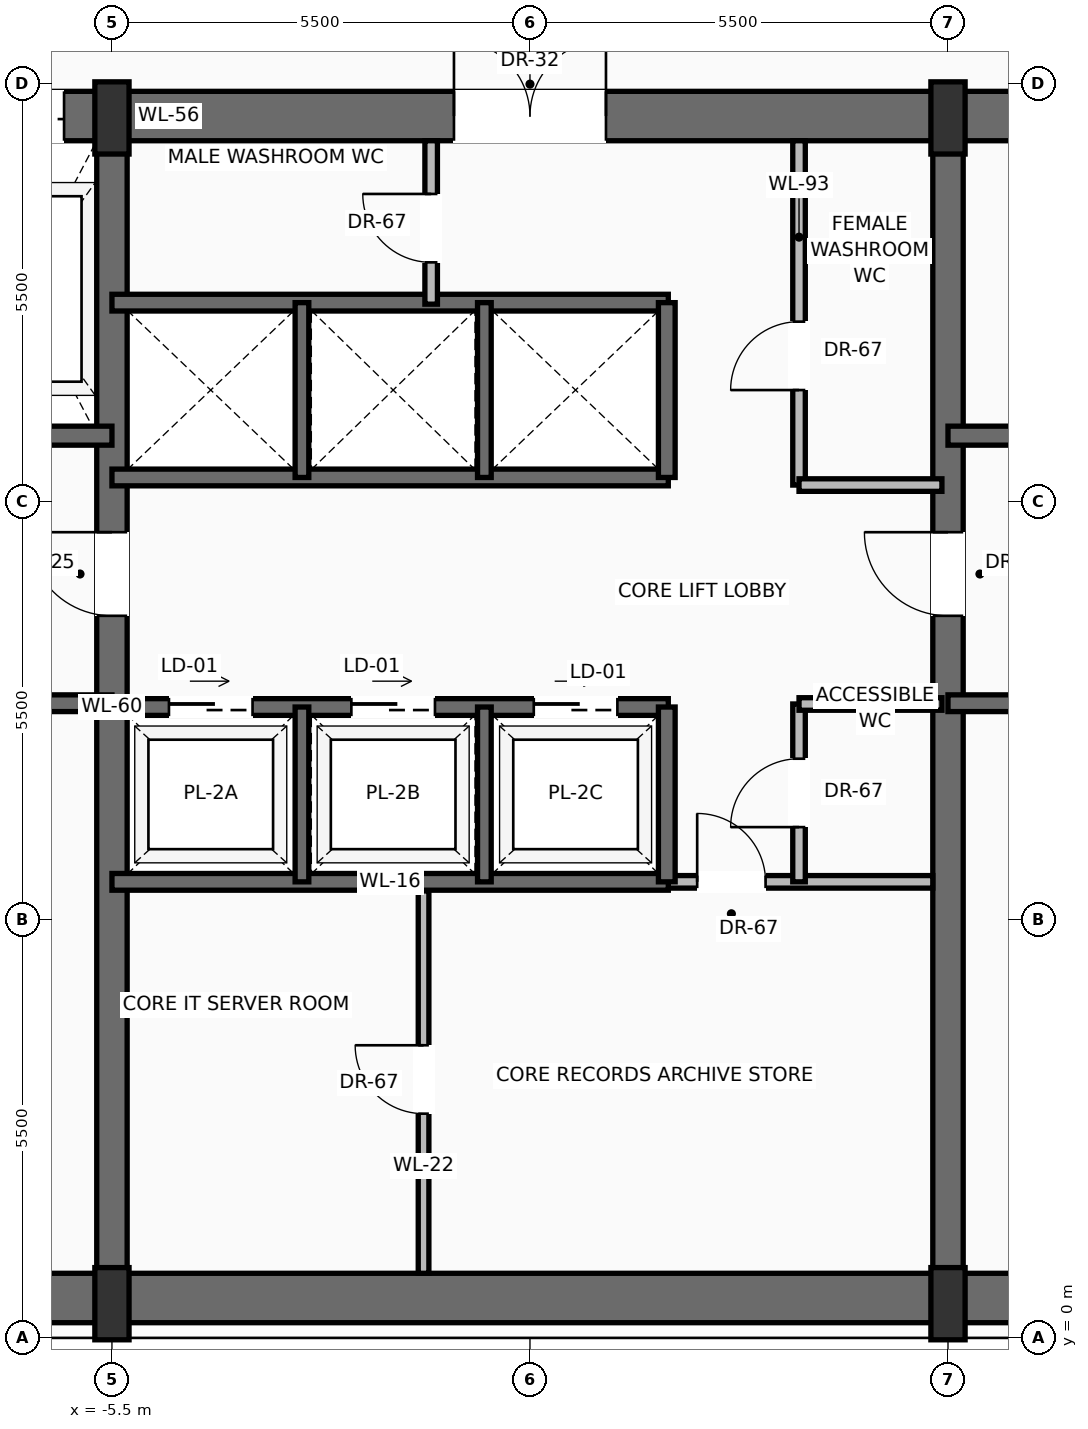
"""IFC4 building model, lengths in metres.
Left out: names, types, materials, properties, quantities, classifications, styles, units other than length and angle.
Written with IfcOpenShell. Run it as: python <this file> out.ifc"""

import sys

from ifc_helpers import new_model, si_unit, direction, frame, frame_2d, origin, origin_2d, place, context, subcontext, project, spatial, rectangle, extrude, source, transform, mapped, element, fill, save


model = new_model("IFC4")
c1 = context("Model", 3, precision=1e-05, world=origin(), true_north=direction((0.0, 1.0)))
c2 = subcontext(c1, "Body", "Model", "MODEL_VIEW")
j1 = project(units=[si_unit("LENGTHUNIT", "METRE"), si_unit("PLANEANGLEUNIT", "RADIAN")], contexts=[c1])
p1 = place(None, origin())
s1 = spatial("IfcSite", under=j1, at=p1, CompositionType="ELEMENT")
p2 = place(p1, origin())
s2 = spatial("IfcBuilding", under=s1, at=p2, CompositionType="ELEMENT")
p3 = place(p2, frame((0.0, 0.0, 182.1)))
s3 = spatial("IfcBuildingStorey", under=s2, at=p3, CompositionType="ELEMENT", Elevation=182.1)
p4 = place(p3, frame((-10.65, 0.525, 0.0), z_axis=(0.0, 0.0, 1.0), x_axis=(1.0, 0.0, 0.0)))
e1 = element("IfcWall", 1, at=p4, inside=s3, PredefinedType="SHEAR", context=c2, shape_type="SweptSolid", body=[
    extrude(rectangle(XDim=21.3, YDim=0.65, at=frame_2d((10.65, 0.0))), origin(), (0.0, 0.0, 1.0), 3.47),
])
p5 = place(p3, frame((-10.8, 16.075, 0.0), z_axis=(0.0, 0.0, 1.0), x_axis=(1.0, 0.0, 0.0)))
e2 = element("IfcWall", 2, at=p5, inside=s3, PredefinedType="SHEAR", context=c2, shape_type="SweptSolid", body=[
    extrude(rectangle(XDim=21.6, YDim=0.65, at=frame_2d((10.8, 0.0))), origin(), (0.0, 0.0, 1.0), 3.47),
])
p6 = place(p5, frame((3.37, 0.0, 0.0)))
e3 = element("IfcOpeningElement", 3, at=p6, cuts=e2, PredefinedType="OPENING", context=c2, shape_type="SweptSolid", body=[
    extrude(rectangle(XDim=1.3, YDim=2.3, at=frame_2d((0.65, 1.15))), frame((0.0, 0.335, 0.0), z_axis=(0.0, -1.0, 0.0), x_axis=(1.0, 0.0, 0.0)), (0.0, 0.0, 1.0), 0.67),
])
p7 = place(p5, frame((9.8, 0.0, 0.0)))
e4 = element("IfcOpeningElement", 4, at=p7, cuts=e2, PredefinedType="OPENING", context=c2, shape_type="SweptSolid", body=[
    extrude(rectangle(XDim=2.0, YDim=2.4, at=frame_2d((1.0, 1.2))), frame((0.0, 0.335, 0.0), z_axis=(0.0, -1.0, 0.0), x_axis=(1.0, 0.0, 0.0)), (0.0, 0.0, 1.0), 0.67),
])
p8 = place(p3, frame((-5.5, 0.525, 0.0), z_axis=(0.0, 0.0, 1.0), x_axis=(0.0, 1.0, 0.0)))
e5 = element("IfcWall", 5, at=p8, inside=s3, PredefinedType="SHEAR", context=c2, shape_type="SweptSolid", body=[
    extrude(rectangle(XDim=15.55, YDim=0.4, at=frame_2d((7.775, 0.0))), origin(), (0.0, 0.0, 1.0), 3.47),
])
p9 = place(p8, frame((8.975, 0.0, 0.0)))
e6 = element("IfcOpeningElement", 6, at=p9, cuts=e5, PredefinedType="OPENING", context=c2, shape_type="SweptSolid", body=[
    extrude(rectangle(XDim=1.1, YDim=2.2, at=frame_2d((0.55, 1.1))), frame((0.0, 0.21, 0.0), z_axis=(0.0, -1.0, 0.0), x_axis=(1.0, 0.0, 0.0)), (0.0, 0.0, 1.0), 0.42),
])
p10 = place(p3, frame((5.5, 0.525, 0.0), z_axis=(0.0, 0.0, 1.0), x_axis=(0.0, 1.0, 0.0)))
e7 = element("IfcWall", 7, at=p10, inside=s3, PredefinedType="SHEAR", context=c2, shape_type="SweptSolid", body=[
    extrude(rectangle(XDim=15.55, YDim=0.4, at=frame_2d((7.775, 0.0))), origin(), (0.0, 0.0, 1.0), 3.47),
])
p11 = place(p10, frame((8.975, 0.0, 0.0)))
e8 = element("IfcOpeningElement", 8, at=p11, cuts=e7, PredefinedType="OPENING", context=c2, shape_type="SweptSolid", body=[
    extrude(rectangle(XDim=1.1, YDim=2.2, at=frame_2d((0.55, 1.1))), frame((0.0, 0.21, 0.0), z_axis=(0.0, -1.0, 0.0), x_axis=(1.0, 0.0, 0.0)), (0.0, 0.0, 1.0), 0.42),
])
m1 = source(origin(), c2, "Body", "SweptSolid", [
    extrude(rectangle(XDim=0.45, YDim=0.95, at=origin_2d()), origin(), (0.0, 0.0, 1.0), 3.7),
])
for number, where, z_axis, x_axis in (
    (9, (-5.5, 0.45, 0.0), (0.0, 0.0, 1.0), (1.0, 0.0, 0.0)),
    (10, (5.5, 0.45, 0.0), (0.0, 0.0, 1.0), (1.0, 0.0, 0.0)),
    (11, (-5.5, 16.05, 0.0), (0.0, 0.0, 1.0), (1.0, 0.0, 0.0)),
    (12, (5.5, 16.05, 0.0), (0.0, 0.0, 1.0), (1.0, 0.0, 0.0)),
):
    element("IfcColumn", number, at=place(p3, frame(where, z_axis=z_axis, x_axis=x_axis)), inside=s3, PredefinedType="PILASTER", context=c2, shape_type="MappedRepresentation", body=[
        mapped(m1, transform((0.0, 0.0, 0.0), scale=1.0)),
    ])
p12 = place(p3, frame((-5.5, 8.35, 0.0), z_axis=(0.0, 0.0, 1.0), x_axis=(-1.0, 0.0, 0.0)))
e13 = element("IfcWall", 13, at=p12, inside=s3, PredefinedType="SOLIDWALL", context=c2, shape_type="SweptSolid", body=[
    extrude(rectangle(XDim=4.65, YDim=0.22, at=frame_2d((2.325, 0.0))), origin(), (0.0, 0.0, 1.0), 3.47),
])
p13 = place(p12, frame((2.5, 0.0, 0.0)))
e14 = element("IfcOpeningElement", 14, at=p13, cuts=e13, PredefinedType="OPENING", context=c2, shape_type="SweptSolid", body=[
    extrude(rectangle(XDim=1.15, YDim=2.2, at=frame_2d((0.575, 1.1))), frame((0.0, 0.12, 0.0), z_axis=(0.0, -1.0, 0.0), x_axis=(1.0, 0.0, 0.0)), (0.0, 0.0, 1.0), 0.24),
])
p14 = place(p3, frame((-5.5, 11.87, 0.0), z_axis=(0.0, 0.0, 1.0), x_axis=(-1.0, 0.0, 0.0)))
e15 = element("IfcWall", 15, at=p14, inside=s3, PredefinedType="SOLIDWALL", context=c2, shape_type="SweptSolid", body=[
    extrude(rectangle(XDim=4.65, YDim=0.25, at=frame_2d((2.325, 0.0))), origin(), (0.0, 0.0, 1.0), 3.47),
])
p15 = place(p14, frame((2.95, 0.0, 0.0)))
e16 = element("IfcOpeningElement", 16, at=p15, cuts=e15, PredefinedType="OPENING", context=c2, shape_type="SweptSolid", body=[
    extrude(rectangle(XDim=1.2, YDim=2.25, at=frame_2d((0.6, 1.125))), frame((0.0, 0.135, 0.0), z_axis=(0.0, -1.0, 0.0), x_axis=(1.0, 0.0, 0.0)), (0.0, 0.0, 1.0), 0.27),
])
p16 = place(p3, frame((10.15, 8.35, 0.0), z_axis=(0.0, 0.0, 1.0), x_axis=(-1.0, 0.0, 0.0)))
e17 = element("IfcWall", 17, at=p16, inside=s3, PredefinedType="SOLIDWALL", context=c2, shape_type="SweptSolid", body=[
    extrude(rectangle(XDim=4.65, YDim=0.22, at=frame_2d((2.325, 0.0))), origin(), (0.0, 0.0, 1.0), 3.47),
])
p17 = place(p16, frame((1.0, 0.0, 0.0)))
e18 = element("IfcOpeningElement", 18, at=p17, cuts=e17, PredefinedType="OPENING", context=c2, shape_type="SweptSolid", body=[
    extrude(rectangle(XDim=1.15, YDim=2.2, at=frame_2d((0.575, 1.1))), frame((0.0, 0.12, 0.0), z_axis=(0.0, -1.0, 0.0), x_axis=(1.0, 0.0, 0.0)), (0.0, 0.0, 1.0), 0.24),
])
p18 = place(p3, frame((10.15, 11.87, 0.0), z_axis=(0.0, 0.0, 1.0), x_axis=(-1.0, 0.0, 0.0)))
e19 = element("IfcWall", 19, at=p18, inside=s3, PredefinedType="SOLIDWALL", context=c2, shape_type="SweptSolid", body=[
    extrude(rectangle(XDim=4.65, YDim=0.25, at=frame_2d((2.325, 0.0))), origin(), (0.0, 0.0, 1.0), 3.47),
])
p19 = place(p18, frame((0.5, 0.0, 0.0)))
e20 = element("IfcOpeningElement", 20, at=p19, cuts=e19, PredefinedType="OPENING", context=c2, shape_type="SweptSolid", body=[
    extrude(rectangle(XDim=1.2, YDim=2.25, at=frame_2d((0.6, 1.125))), frame((0.0, 0.135, 0.0), z_axis=(0.0, -1.0, 0.0), x_axis=(1.0, 0.0, 0.0)), (0.0, 0.0, 1.0), 0.27),
])
p20 = place(p3, frame((1.82, 6.0, 0.0), z_axis=(0.0, 0.0, 1.0), x_axis=(1.0, 0.0, 0.0)))
e21 = element("IfcWall", 21, at=p20, inside=s3, PredefinedType="PARTITIONING", context=c2, shape_type="SweptSolid", body=[
    extrude(rectangle(XDim=3.48, YDim=0.165, at=frame_2d((1.74, 0.0))), origin(), (0.0, 0.0, 1.0), 3.462),
])
p21 = place(p20, frame((0.38, 0.0, 0.0)))
e22 = element("IfcOpeningElement", 22, at=p21, cuts=e21, PredefinedType="OPENING", context=c2, shape_type="SweptSolid", body=[
    extrude(rectangle(XDim=0.9, YDim=2.1, at=frame_2d((0.45, 1.05))), frame((0.0, 0.093, 0.0), z_axis=(0.0, -1.0, 0.0), x_axis=(1.0, 0.0, 0.0)), (0.0, 0.0, 1.0), 0.185),
])
p22 = place(p3, frame((-1.4, 0.85, 0.0), z_axis=(0.0, 0.0, 1.0), x_axis=(0.0, 1.0, 0.0)))
e23 = element("IfcWall", 23, at=p22, inside=s3, PredefinedType="PARTITIONING", context=c2, shape_type="SweptSolid", body=[
    extrude(rectangle(XDim=5.03, YDim=0.14, at=frame_2d((2.515, 0.0))), origin(), (0.0, 0.0, 1.0), 3.462),
])
p23 = place(p22, frame((2.1, 0.0, 0.0)))
e24 = element("IfcOpeningElement", 24, at=p23, cuts=e23, PredefinedType="OPENING", context=c2, shape_type="SweptSolid", body=[
    extrude(rectangle(XDim=0.9, YDim=2.1, at=frame_2d((0.45, 1.05))), frame((0.0, 0.08, 0.0), z_axis=(0.0, -1.0, 0.0), x_axis=(1.0, 0.0, 0.0)), (0.0, 0.0, 1.0), 0.16),
])
p24 = place(p3, frame((3.54, 6.0, 0.0), z_axis=(0.0, 0.0, 1.0), x_axis=(0.0, 1.0, 0.0)))
e25 = element("IfcWall", 25, at=p24, inside=s3, PredefinedType="PARTITIONING", context=c2, shape_type="SweptSolid", body=[
    extrude(rectangle(XDim=2.34, YDim=0.165, at=frame_2d((1.17, 0.0))), origin(), (0.0, 0.0, 1.0), 3.462),
])
p25 = place(p24, frame((0.72, 0.0, 0.0)))
e26 = element("IfcOpeningElement", 26, at=p25, cuts=e25, PredefinedType="OPENING", context=c2, shape_type="SweptSolid", body=[
    extrude(rectangle(XDim=0.9, YDim=2.1, at=frame_2d((0.45, 1.05))), frame((0.0, 0.093, 0.0), z_axis=(0.0, -1.0, 0.0), x_axis=(1.0, 0.0, 0.0)), (0.0, 0.0, 1.0), 0.185),
])
p26 = place(p3, frame((3.54, 8.34, 0.0), z_axis=(0.0, 0.0, 1.0), x_axis=(1.0, 0.0, 0.0)))
e27 = element("IfcWall", 27, at=p26, inside=s3, PredefinedType="PARTITIONING", context=c2, shape_type="SweptSolid", body=[
    extrude(rectangle(XDim=1.88, YDim=0.165, at=frame_2d((0.94, 0.0))), origin(), (0.0, 0.0, 1.0), 3.462),
])
p27 = place(p3, frame((-5.5, 6.0, 0.0), z_axis=(0.0, 0.0, 1.0), x_axis=(1.0, 0.0, 0.0)))
e28 = element("IfcWall", 28, at=p27, inside=s3, PredefinedType="SOLIDWALL", context=c2, shape_type="SweptSolid", body=[
    extrude(rectangle(XDim=7.32, YDim=0.22, at=frame_2d((3.66, 0.0))), origin(), (0.0, 0.0, 1.0), 3.47),
])
p28 = place(p3, frame((-5.5, 8.3, 0.0), z_axis=(0.0, 0.0, 1.0), x_axis=(1.0, 0.0, 0.0)))
e29 = element("IfcWall", 29, at=p28, inside=s3, PredefinedType="SOLIDWALL", context=c2, shape_type="SweptSolid", body=[
    extrude(rectangle(XDim=7.32, YDim=0.22, at=frame_2d((3.66, 0.0))), origin(), (0.0, 0.0, 1.0), 3.47),
])
p29 = place(p28, frame((0.75, 0.0, 0.0)))
e30 = element("IfcOpeningElement", 30, at=p29, cuts=e29, PredefinedType="OPENING", context=c2, shape_type="SweptSolid", body=[
    extrude(rectangle(XDim=1.1, YDim=2.2, at=frame_2d((0.55, 1.1))), frame((0.0, 0.12, 0.0), z_axis=(0.0, -1.0, 0.0), x_axis=(1.0, 0.0, 0.0)), (0.0, 0.0, 1.0), 0.24),
])
p30 = place(p28, frame((3.15, 0.0, 0.0)))
e31 = element("IfcOpeningElement", 31, at=p30, cuts=e29, PredefinedType="OPENING", context=c2, shape_type="SweptSolid", body=[
    extrude(rectangle(XDim=1.1, YDim=2.2, at=frame_2d((0.55, 1.1))), frame((0.0, 0.12, 0.0), z_axis=(0.0, -1.0, 0.0), x_axis=(1.0, 0.0, 0.0)), (0.0, 0.0, 1.0), 0.24),
])
p31 = place(p28, frame((5.55, 0.0, 0.0)))
e32 = element("IfcOpeningElement", 32, at=p31, cuts=e29, PredefinedType="OPENING", context=c2, shape_type="SweptSolid", body=[
    extrude(rectangle(XDim=1.1, YDim=2.2, at=frame_2d((0.55, 1.1))), frame((0.0, 0.12, 0.0), z_axis=(0.0, -1.0, 0.0), x_axis=(1.0, 0.0, 0.0)), (0.0, 0.0, 1.0), 0.24),
])
p32 = place(p3, frame((1.8, 6.0, 0.0), z_axis=(0.0, 0.0, 1.0), x_axis=(0.0, 1.0, 0.0)))
e33 = element("IfcWall", 33, at=p32, inside=s3, PredefinedType="SOLIDWALL", context=c2, shape_type="SweptSolid", body=[
    extrude(rectangle(XDim=2.3, YDim=0.22, at=frame_2d((1.15, 0.0))), origin(), (0.0, 0.0, 1.0), 3.47),
])
for number, where, z_axis, x_axis in (
    (34, (-3.0, 6.0, 0.0), (0.0, 0.0, 1.0), (0.0, 1.0, 0.0)),
    (35, (-0.6, 6.0, 0.0), (0.0, 0.0, 1.0), (0.0, 1.0, 0.0)),
):
    element("IfcWall", number, at=place(p3, frame(where, z_axis=z_axis, x_axis=x_axis)), inside=s3, PredefinedType="SOLIDWALL", context=c2, shape_type="SweptSolid", body=[
        extrude(rectangle(XDim=2.3, YDim=0.18, at=frame_2d((1.15, 0.0))), origin(), (0.0, 0.0, 1.0), 3.47),
    ])
for number, where, z_axis, x_axis in (
    (36, (-5.5, 11.32, 0.0), (0.0, 0.0, 1.0), (1.0, 0.0, 0.0)),
    (37, (-5.5, 13.62, 0.0), (0.0, 0.0, 1.0), (1.0, 0.0, 0.0)),
):
    element("IfcWall", number, at=place(p3, frame(where, z_axis=z_axis, x_axis=x_axis)), inside=s3, PredefinedType="SOLIDWALL", context=c2, shape_type="SweptSolid", body=[
        extrude(rectangle(XDim=7.32, YDim=0.22, at=frame_2d((3.66, 0.0))), origin(), (0.0, 0.0, 1.0), 3.47),
    ])
p33 = place(p3, frame((1.8, 11.32, 0.0), z_axis=(0.0, 0.0, 1.0), x_axis=(0.0, 1.0, 0.0)))
e38 = element("IfcWall", 38, at=p33, inside=s3, PredefinedType="SOLIDWALL", context=c2, shape_type="SweptSolid", body=[
    extrude(rectangle(XDim=2.3, YDim=0.22, at=frame_2d((1.15, 0.0))), origin(), (0.0, 0.0, 1.0), 3.47),
])
for number, where, z_axis, x_axis in (
    (39, (-3.0, 11.32, 0.0), (0.0, 0.0, 1.0), (0.0, 1.0, 0.0)),
    (40, (-0.6, 11.32, 0.0), (0.0, 0.0, 1.0), (0.0, 1.0, 0.0)),
):
    element("IfcWall", number, at=place(p3, frame(where, z_axis=z_axis, x_axis=x_axis)), inside=s3, PredefinedType="SOLIDWALL", context=c2, shape_type="SweptSolid", body=[
        extrude(rectangle(XDim=2.3, YDim=0.18, at=frame_2d((1.15, 0.0))), origin(), (0.0, 0.0, 1.0), 3.47),
    ])
p34 = place(p3, frame((-1.3, 13.6, 0.0), z_axis=(0.0, 0.0, 1.0), x_axis=(0.0, 1.0, 0.0)))
e41 = element("IfcWall", 41, at=p34, inside=s3, PredefinedType="PARTITIONING", context=c2, shape_type="SweptSolid", body=[
    extrude(rectangle(XDim=2.15, YDim=0.165, at=frame_2d((1.075, 0.0))), origin(), (0.0, 0.0, 1.0), 3.462),
])
p35 = place(p34, frame((0.55, 0.0, 0.0)))
e42 = element("IfcOpeningElement", 42, at=p35, cuts=e41, PredefinedType="OPENING", context=c2, shape_type="SweptSolid", body=[
    extrude(rectangle(XDim=0.9, YDim=2.1, at=frame_2d((0.45, 1.05))), frame((0.0, 0.093, 0.0), z_axis=(0.0, -1.0, 0.0), x_axis=(1.0, 0.0, 0.0)), (0.0, 0.0, 1.0), 0.185),
])
p36 = place(p3, frame((3.54, 11.22, 0.0), z_axis=(0.0, 0.0, 1.0), x_axis=(0.0, 1.0, 0.0)))
e43 = element("IfcWall", 43, at=p36, inside=s3, PredefinedType="PARTITIONING", context=c2, shape_type="SweptSolid", body=[
    extrude(rectangle(XDim=4.53, YDim=0.165, at=frame_2d((2.265, 0.0))), origin(), (0.0, 0.0, 1.0), 3.462),
])
p37 = place(p36, frame((1.25, 0.0, 0.0)))
e44 = element("IfcOpeningElement", 44, at=p37, cuts=e43, PredefinedType="OPENING", context=c2, shape_type="SweptSolid", body=[
    extrude(rectangle(XDim=0.9, YDim=2.1, at=frame_2d((0.45, 1.05))), frame((0.0, 0.093, 0.0), z_axis=(0.0, -1.0, 0.0), x_axis=(1.0, 0.0, 0.0)), (0.0, 0.0, 1.0), 0.185),
])
p38 = place(p3, frame((3.54, 11.22, 0.0), z_axis=(0.0, 0.0, 1.0), x_axis=(1.0, 0.0, 0.0)))
e45 = element("IfcWall", 45, at=p38, inside=s3, PredefinedType="PARTITIONING", context=c2, shape_type="SweptSolid", body=[
    extrude(rectangle(XDim=1.88, YDim=0.165, at=frame_2d((0.94, 0.0))), origin(), (0.0, 0.0, 1.0), 3.462),
])
m2 = source(origin(), c2, "Body", "SweptSolid", [
    extrude(rectangle(XDim=1.1, YDim=2.2, at=frame_2d((0.55, 1.1))), frame((0.0, 0.025, 0.0), z_axis=(0.0, -1.0, 0.0), x_axis=(1.0, 0.0, 0.0)), (0.0, 0.0, 1.0), 0.05),
])
p39 = place(p9, origin())
e46 = element("IfcDoor", 46, at=p39, inside=s3, OperationType="SINGLE_SWING_RIGHT", PredefinedType="DOOR", context=c2, shape_type="MappedRepresentation", body=[
    mapped(m2, transform((0.0, 0.0, 0.0), scale=1.0)),
])
fill(e6, e46)
m3 = source(origin(), c2, "Body", "SweptSolid", [
    extrude(rectangle(XDim=1.3, YDim=2.3, at=frame_2d((0.65, 1.15))), frame((0.0, 0.025, 0.0), z_axis=(0.0, -1.0, 0.0), x_axis=(1.0, 0.0, 0.0)), (0.0, 0.0, 1.0), 0.05),
])
p40 = place(p6, origin())
e47 = element("IfcDoor", 47, at=p40, inside=s3, OperationType="SLIDING_TO_RIGHT", PredefinedType="DOOR", context=c2, shape_type="MappedRepresentation", body=[
    mapped(m3, transform((0.0, 0.0, 0.0), scale=1.0)),
])
fill(e3, e47)
p41 = place(p11, origin())
e48 = element("IfcDoor", 48, at=p41, inside=s3, OperationType="SINGLE_SWING_RIGHT", PredefinedType="DOOR", context=c2, shape_type="MappedRepresentation", body=[
    mapped(m2, transform((0.0, 0.0, 0.0), scale=1.0)),
])
fill(e8, e48)
m4 = source(origin(), c2, "Body", "SweptSolid", [
    extrude(rectangle(XDim=2.0, YDim=2.4, at=frame_2d((1.0, 1.2))), frame((0.0, 0.025, 0.0), z_axis=(0.0, -1.0, 0.0), x_axis=(1.0, 0.0, 0.0)), (0.0, 0.0, 1.0), 0.05),
])
p42 = place(p7, origin())
e49 = element("IfcDoor", 49, at=p42, inside=s3, OperationType="DOUBLE_DOOR_SINGLE_SWING", PredefinedType="DOOR", context=c2, shape_type="MappedRepresentation", body=[
    mapped(m4, transform((0.0, 0.0, 0.0), scale=1.0)),
])
fill(e4, e49)
m5 = source(origin(), c2, "Body", "SweptSolid", [
    extrude(rectangle(XDim=0.9, YDim=2.1, at=frame_2d((0.45, 1.05))), frame((0.0, 0.025, 0.0), z_axis=(0.0, -1.0, 0.0), x_axis=(1.0, 0.0, 0.0)), (0.0, 0.0, 1.0), 0.05),
])
p43 = place(p21, origin())
e50 = element("IfcDoor", 50, at=p43, inside=s3, OperationType="SINGLE_SWING_LEFT", PredefinedType="DOOR", context=c2, shape_type="MappedRepresentation", body=[
    mapped(m5, transform((0.0, 0.0, 0.0), scale=1.0)),
])
fill(e22, e50)
p44 = place(p23, origin())
e51 = element("IfcDoor", 51, at=p44, inside=s3, OperationType="SINGLE_SWING_RIGHT", PredefinedType="DOOR", context=c2, shape_type="MappedRepresentation", body=[
    mapped(m5, transform((0.0, 0.0, 0.0), scale=1.0)),
])
fill(e24, e51)
p45 = place(p25, origin())
e52 = element("IfcDoor", 52, at=p45, inside=s3, OperationType="SINGLE_SWING_LEFT", PredefinedType="DOOR", context=c2, shape_type="MappedRepresentation", body=[
    mapped(m5, transform((0.0, 0.0, 0.0), scale=1.0)),
])
fill(e26, e52)
m6 = source(origin(), c2, "Body", "SweptSolid", [
    extrude(rectangle(XDim=1.1, YDim=2.2, at=frame_2d((0.55, 1.1))), frame((0.0, 0.025, 0.0), z_axis=(0.0, -1.0, 0.0), x_axis=(1.0, 0.0, 0.0)), (0.0, 0.0, 1.0), 0.05),
])
p46 = place(p29, origin())
e53 = element("IfcDoor", 53, at=p46, inside=s3, OperationType="SLIDING_TO_LEFT", PredefinedType="DOOR", context=c2, shape_type="MappedRepresentation", body=[
    mapped(m6, transform((0.0, 0.0, 0.0), scale=1.0)),
])
fill(e30, e53)
p47 = place(p30, origin())
e54 = element("IfcDoor", 54, at=p47, inside=s3, OperationType="SLIDING_TO_LEFT", PredefinedType="DOOR", context=c2, shape_type="MappedRepresentation", body=[
    mapped(m6, transform((0.0, 0.0, 0.0), scale=1.0)),
])
fill(e31, e54)
p48 = place(p31, origin())
e55 = element("IfcDoor", 55, at=p48, inside=s3, OperationType="SLIDING_TO_LEFT", PredefinedType="DOOR", context=c2, shape_type="MappedRepresentation", body=[
    mapped(m6, transform((0.0, 0.0, 0.0), scale=1.0)),
])
fill(e32, e55)
p49 = place(p35, origin())
e56 = element("IfcDoor", 56, at=p49, inside=s3, OperationType="SINGLE_SWING_RIGHT", PredefinedType="DOOR", context=c2, shape_type="MappedRepresentation", body=[
    mapped(m5, transform((0.0, 0.0, 0.0), scale=1.0)),
])
fill(e42, e56)
p50 = place(p37, origin())
e57 = element("IfcDoor", 57, at=p50, inside=s3, OperationType="SINGLE_SWING_LEFT", PredefinedType="DOOR", context=c2, shape_type="MappedRepresentation", body=[
    mapped(m5, transform((0.0, 0.0, 0.0), scale=1.0)),
])
fill(e44, e57)
save(model, sys.argv[1])
